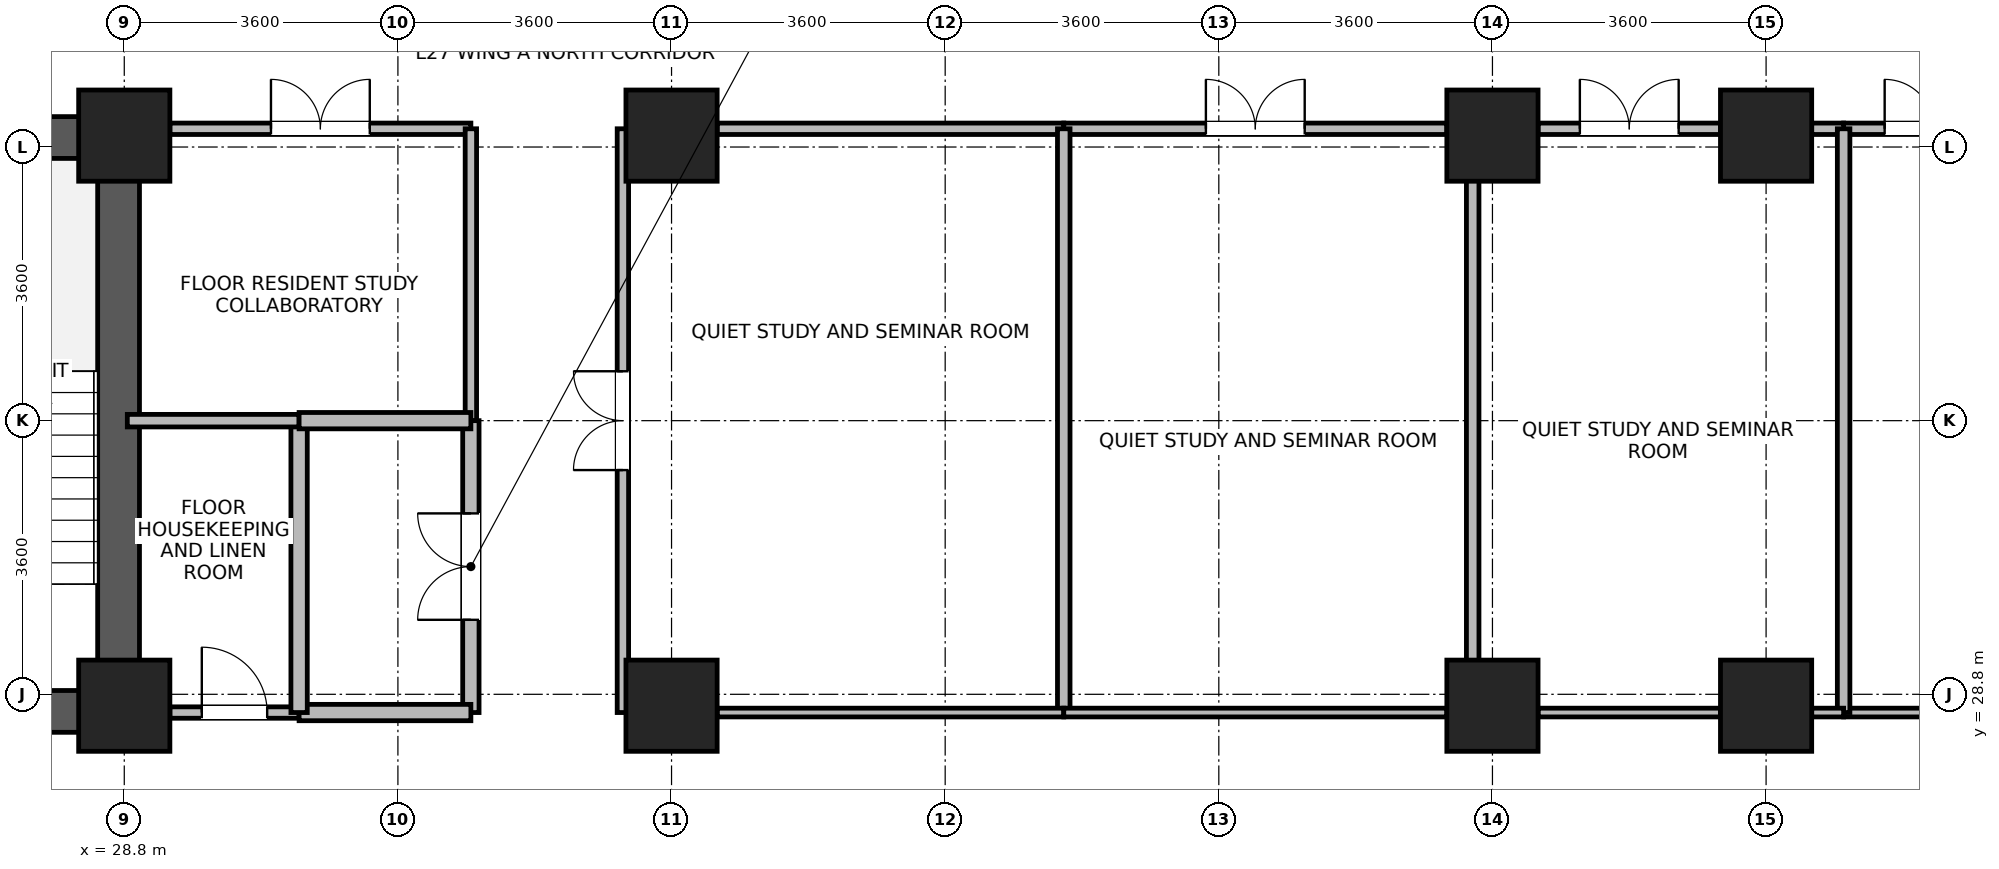
"""IFC4 building model, lengths in metres.
Left out: names, types, materials, properties, quantities, classifications, styles, units other than length and angle.
Written with IfcOpenShell. Run it as: python <this file> out.ifc"""

import sys

from ifc_helpers import new_model, si_unit, direction, frame, frame_2d, origin, origin_2d, place, context, subcontext, project, spatial, rectangle, extrude, source, transform, mapped, element, fill, save


model = new_model("IFC4")
c1 = context("Model", 3, precision=1e-05, world=origin(), true_north=direction((0.0, 1.0)))
c2 = subcontext(c1, "Body", "Model", "MODEL_VIEW")
j1 = project(units=[si_unit("LENGTHUNIT", "METRE"), si_unit("PLANEANGLEUNIT", "RADIAN")], contexts=[c1])
p1 = place(None, origin())
s1 = spatial("IfcSite", under=j1, at=p1, CompositionType="ELEMENT")
p2 = place(p1, origin())
s2 = spatial("IfcBuilding", under=s1, at=p2, CompositionType="ELEMENT")
p3 = place(p2, frame((0.0, 0.0, 108.2)))
s3 = spatial("IfcBuildingStorey", under=s2, at=p3, CompositionType="ELEMENT", Elevation=108.2)
p4 = place(p3, frame((28.725, 28.3, 0.0), z_axis=(0.0, 0.0, 1.0), x_axis=(0.0, 1.0, 0.0)))
e1 = element("IfcWall", 1, at=p4, inside=s3, PredefinedType="SHEAR", context=c2, shape_type="SweptSolid", body=[
    extrude(rectangle(XDim=8.1, YDim=0.55, at=frame_2d((4.05, 0.0))), origin(), (0.0, 0.0, 1.0), 3.45),
])
for number, where, z_axis, x_axis in (
    (2, (25.25, 28.575, 0.0), (0.0, 0.0, 1.0), (1.0, 0.0, 0.0)),
    (3, (25.25, 36.125, 0.0), (0.0, 0.0, 1.0), (1.0, 0.0, 0.0)),
):
    element("IfcWall", number, at=place(p3, frame(where, z_axis=z_axis, x_axis=x_axis)), inside=s3, PredefinedType="SHEAR", context=c2, shape_type="SweptSolid", body=[
        extrude(rectangle(XDim=3.2, YDim=0.55, at=frame_2d((1.6, 0.0))), origin(), (0.0, 0.0, 1.0), 3.45),
    ])
m1 = source(origin(), c2, "Body", "SweptSolid", [
    extrude(rectangle(XDim=1.2, YDim=1.2, at=origin_2d()), origin(), (0.0, 0.0, 1.0), 3.7),
])
for number, where, z_axis, x_axis in (
    (4, (28.8, 28.65, 0.0), (0.0, 0.0, 1.0), (1.0, 0.0, 0.0)),
    (5, (28.8, 36.15, 0.0), (0.0, 0.0, 1.0), (1.0, 0.0, 0.0)),
    (6, (36.0, 28.65, 0.0), (0.0, 0.0, 1.0), (1.0, 0.0, 0.0)),
    (7, (36.0, 36.15, 0.0), (0.0, 0.0, 1.0), (1.0, 0.0, 0.0)),
    (8, (46.8, 28.65, 0.0), (0.0, 0.0, 1.0), (1.0, 0.0, 0.0)),
    (9, (46.8, 36.15, 0.0), (0.0, 0.0, 1.0), (1.0, 0.0, 0.0)),
    (10, (50.4, 28.65, 0.0), (0.0, 0.0, 1.0), (1.0, 0.0, 0.0)),
    (11, (50.4, 36.15, 0.0), (0.0, 0.0, 1.0), (1.0, 0.0, 0.0)),
):
    element("IfcColumn", number, at=place(p3, frame(where, z_axis=z_axis, x_axis=x_axis)), inside=s3, PredefinedType="COLUMN", context=c2, shape_type="MappedRepresentation", body=[
        mapped(m1, transform((0.0, 0.0, 0.0), x_axis=(1.0, 0.0, 0.0), y_axis=(0.0, 1.0, 0.0), z_axis=(0.0, 0.0, 1.0), scale=1.0)),
    ])
p5 = place(p3, frame((51.42, 36.24, 0.0), z_axis=(0.0, 0.0, 1.0), x_axis=(1.0, 0.0, 0.0)))
e12 = element("IfcWall", 12, at=p5, inside=s3, PredefinedType="PARTITIONING", context=c2, shape_type="SweptSolid", body=[
    extrude(rectangle(XDim=2.38, YDim=0.15, at=frame_2d((1.19, 0.0))), origin(), (0.0, 0.0, 1.0), 2.78),
])
p6 = place(p5, frame((0.54, 0.0, 0.0)))
e13 = element("IfcOpeningElement", 13, at=p6, cuts=e12, PredefinedType="OPENING", context=c2, shape_type="SweptSolid", body=[
    extrude(rectangle(XDim=1.3, YDim=2.12, at=frame_2d((0.65, 1.06))), frame((0.0, 0.085, 0.0), z_axis=(0.0, -1.0, 0.0), x_axis=(1.0, 0.0, 0.0)), (0.0, 0.0, 1.0), 0.17),
])
p7 = place(p3, frame((35.36, 28.56, 0.0), z_axis=(0.0, 0.0, 1.0), x_axis=(0.0, 1.0, 0.0)))
e14 = element("IfcWall", 14, at=p7, inside=s3, PredefinedType="PARTITIONING", context=c2, shape_type="SweptSolid", body=[
    extrude(rectangle(XDim=7.68, YDim=0.15, at=frame_2d((3.84, 0.0))), origin(), (0.0, 0.0, 1.0), 3.43),
])
p8 = place(p7, frame((3.19, 0.0, 0.0)))
e15 = element("IfcOpeningElement", 15, at=p8, cuts=e14, PredefinedType="OPENING", context=c2, shape_type="SweptSolid", body=[
    extrude(rectangle(XDim=1.3, YDim=2.12, at=frame_2d((0.65, 1.06))), frame((0.0, 0.085, 0.0), z_axis=(0.0, -1.0, 0.0), x_axis=(1.0, 0.0, 0.0)), (0.0, 0.0, 1.0), 0.17),
])
p9 = place(p3, frame((36.6, 36.24, 0.0), z_axis=(0.0, 0.0, 1.0), x_axis=(1.0, 0.0, 0.0)))
e16 = element("IfcWall", 16, at=p9, inside=s3, PredefinedType="PARTITIONING", context=c2, shape_type="SweptSolid", body=[
    extrude(rectangle(XDim=4.56, YDim=0.15, at=frame_2d((2.28, 0.0))), origin(), (0.0, 0.0, 1.0), 2.78),
])
p10 = place(p3, frame((41.16, 36.24, 0.0), z_axis=(0.0, 0.0, 1.0), x_axis=(1.0, 0.0, 0.0)))
e17 = element("IfcWall", 17, at=p10, inside=s3, PredefinedType="PARTITIONING", context=c2, shape_type="SweptSolid", body=[
    extrude(rectangle(XDim=5.04, YDim=0.15, at=frame_2d((2.52, 0.0))), origin(), (0.0, 0.0, 1.0), 2.78),
])
p11 = place(p10, frame((1.87, 0.0, 0.0)))
e18 = element("IfcOpeningElement", 18, at=p11, cuts=e17, PredefinedType="OPENING", context=c2, shape_type="SweptSolid", body=[
    extrude(rectangle(XDim=1.3, YDim=2.12, at=frame_2d((0.65, 1.06))), frame((0.0, 0.085, 0.0), z_axis=(0.0, -1.0, 0.0), x_axis=(1.0, 0.0, 0.0)), (0.0, 0.0, 1.0), 0.17),
])
p12 = place(p3, frame((47.4, 36.24, 0.0), z_axis=(0.0, 0.0, 1.0), x_axis=(1.0, 0.0, 0.0)))
e19 = element("IfcWall", 19, at=p12, inside=s3, PredefinedType="PARTITIONING", context=c2, shape_type="SweptSolid", body=[
    extrude(rectangle(XDim=2.4, YDim=0.15, at=frame_2d((1.2, 0.0))), origin(), (0.0, 0.0, 1.0), 2.78),
])
p13 = place(p12, frame((0.55, 0.0, 0.0)))
e20 = element("IfcOpeningElement", 20, at=p13, cuts=e19, PredefinedType="OPENING", context=c2, shape_type="SweptSolid", body=[
    extrude(rectangle(XDim=1.3, YDim=2.12, at=frame_2d((0.65, 1.06))), frame((0.0, 0.085, 0.0), z_axis=(0.0, -1.0, 0.0), x_axis=(1.0, 0.0, 0.0)), (0.0, 0.0, 1.0), 0.17),
])
p14 = place(p3, frame((51.0, 36.24, 0.0), z_axis=(0.0, 0.0, 1.0), x_axis=(1.0, 0.0, 0.0)))
e21 = element("IfcWall", 21, at=p14, inside=s3, PredefinedType="PARTITIONING", context=c2, shape_type="SweptSolid", body=[
    extrude(rectangle(XDim=0.42, YDim=0.15, at=frame_2d((0.21, 0.0))), origin(), (0.0, 0.0, 1.0), 2.78),
])
p15 = place(p3, frame((29.4, 36.24, 0.0), z_axis=(0.0, 0.0, 1.0), x_axis=(1.0, 0.0, 0.0)))
e22 = element("IfcWall", 22, at=p15, inside=s3, PredefinedType="PARTITIONING", context=c2, shape_type="SweptSolid", body=[
    extrude(rectangle(XDim=3.96, YDim=0.15, at=frame_2d((1.98, 0.0))), origin(), (0.0, 0.0, 1.0), 2.78),
])
p16 = place(p15, frame((1.33, 0.0, 0.0)))
e23 = element("IfcOpeningElement", 23, at=p16, cuts=e22, PredefinedType="OPENING", context=c2, shape_type="SweptSolid", body=[
    extrude(rectangle(XDim=1.3, YDim=2.12, at=frame_2d((0.65, 1.06))), frame((0.0, 0.085, 0.0), z_axis=(0.0, -1.0, 0.0), x_axis=(1.0, 0.0, 0.0)), (0.0, 0.0, 1.0), 0.17),
])
p17 = place(p3, frame((33.36, 32.4, 0.0), z_axis=(0.0, 0.0, 1.0), x_axis=(0.0, 1.0, 0.0)))
e24 = element("IfcWall", 24, at=p17, inside=s3, PredefinedType="PARTITIONING", context=c2, shape_type="SweptSolid", body=[
    extrude(rectangle(XDim=3.84, YDim=0.15, at=frame_2d((1.92, 0.0))), origin(), (0.0, 0.0, 1.0), 3.43),
])
p18 = place(p3, frame((33.36, 28.56, 0.0), z_axis=(0.0, 0.0, 1.0), x_axis=(0.0, 1.0, 0.0)))
e25 = element("IfcWall", 25, at=p18, inside=s3, PredefinedType="PARTITIONING", context=c2, shape_type="SweptSolid", body=[
    extrude(rectangle(XDim=3.84, YDim=0.215, at=frame_2d((1.92, 0.0))), origin(), (0.0, 0.0, 1.0), 3.43),
])
p19 = place(p18, frame((1.22, 0.0, 0.0)))
e26 = element("IfcOpeningElement", 26, at=p19, cuts=e25, PredefinedType="OPENING", context=c2, shape_type="SweptSolid", body=[
    extrude(rectangle(XDim=1.4, YDim=2.15, at=frame_2d((0.7, 1.075))), frame((0.0, 0.118, 0.0), z_axis=(0.0, -1.0, 0.0), x_axis=(1.0, 0.0, 0.0)), (0.0, 0.0, 1.0), 0.235),
])
p20 = place(p3, frame((29.4, 28.56, 0.0), z_axis=(0.0, 0.0, 1.0), x_axis=(1.0, 0.0, 0.0)))
e27 = element("IfcWall", 27, at=p20, inside=s3, PredefinedType="PARTITIONING", context=c2, shape_type="SweptSolid", body=[
    extrude(rectangle(XDim=1.7, YDim=0.15, at=frame_2d((0.85, 0.0))), origin(), (0.0, 0.0, 1.0), 2.78),
])
p21 = place(p20, frame((0.42, 0.0, 0.0)))
e28 = element("IfcOpeningElement", 28, at=p21, cuts=e27, PredefinedType="OPENING", context=c2, shape_type="SweptSolid", body=[
    extrude(rectangle(XDim=0.86, YDim=2.02, at=frame_2d((0.43, 1.01))), frame((0.0, 0.085, 0.0), z_axis=(0.0, -1.0, 0.0), x_axis=(1.0, 0.0, 0.0)), (0.0, 0.0, 1.0), 0.17),
])
p22 = place(p3, frame((31.1, 28.56, 0.0), z_axis=(0.0, 0.0, 1.0), x_axis=(1.0, 0.0, 0.0)))
e29 = element("IfcWall", 29, at=p22, inside=s3, PredefinedType="PARTITIONING", context=c2, shape_type="SweptSolid", body=[
    extrude(rectangle(XDim=2.26, YDim=0.215, at=frame_2d((1.13, 0.0))), origin(), (0.0, 0.0, 1.0), 2.78),
])
p23 = place(p3, frame((51.42, 28.56, 0.0), z_axis=(0.0, 0.0, 1.0), x_axis=(1.0, 0.0, 0.0)))
e30 = element("IfcWall", 30, at=p23, inside=s3, PredefinedType="PARTITIONING", context=c2, shape_type="SweptSolid", body=[
    extrude(rectangle(XDim=2.38, YDim=0.115, at=frame_2d((1.19, 0.0))), origin(), (0.0, 0.0, 1.0), 2.78),
])
for number, where, z_axis, x_axis in (
    (31, (41.16, 28.56, 0.0), (0.0, 0.0, 1.0), (0.0, 1.0, 0.0)),
    (32, (46.54, 28.56, 0.0), (0.0, 0.0, 1.0), (0.0, 1.0, 0.0)),
    (33, (51.42, 28.56, 0.0), (0.0, 0.0, 1.0), (0.0, 1.0, 0.0)),
):
    element("IfcWall", number, at=place(p3, frame(where, z_axis=z_axis, x_axis=x_axis)), inside=s3, PredefinedType="PARTITIONING", context=c2, shape_type="SweptSolid", body=[
        extrude(rectangle(XDim=7.68, YDim=0.165, at=frame_2d((3.84, 0.0))), origin(), (0.0, 0.0, 1.0), 3.43),
    ])
p24 = place(p3, frame((36.6, 28.56, 0.0), z_axis=(0.0, 0.0, 1.0), x_axis=(1.0, 0.0, 0.0)))
e34 = element("IfcWall", 34, at=p24, inside=s3, PredefinedType="PARTITIONING", context=c2, shape_type="SweptSolid", body=[
    extrude(rectangle(XDim=4.56, YDim=0.115, at=frame_2d((2.28, 0.0))), origin(), (0.0, 0.0, 1.0), 2.78),
])
p25 = place(p3, frame((41.16, 28.56, 0.0), z_axis=(0.0, 0.0, 1.0), x_axis=(1.0, 0.0, 0.0)))
e35 = element("IfcWall", 35, at=p25, inside=s3, PredefinedType="PARTITIONING", context=c2, shape_type="SweptSolid", body=[
    extrude(rectangle(XDim=5.04, YDim=0.115, at=frame_2d((2.52, 0.0))), origin(), (0.0, 0.0, 1.0), 2.78),
])
p26 = place(p3, frame((47.4, 28.56, 0.0), z_axis=(0.0, 0.0, 1.0), x_axis=(1.0, 0.0, 0.0)))
e36 = element("IfcWall", 36, at=p26, inside=s3, PredefinedType="PARTITIONING", context=c2, shape_type="SweptSolid", body=[
    extrude(rectangle(XDim=2.4, YDim=0.115, at=frame_2d((1.2, 0.0))), origin(), (0.0, 0.0, 1.0), 2.78),
])
p27 = place(p3, frame((51.0, 28.56, 0.0), z_axis=(0.0, 0.0, 1.0), x_axis=(1.0, 0.0, 0.0)))
e37 = element("IfcWall", 37, at=p27, inside=s3, PredefinedType="PARTITIONING", context=c2, shape_type="SweptSolid", body=[
    extrude(rectangle(XDim=0.42, YDim=0.115, at=frame_2d((0.21, 0.0))), origin(), (0.0, 0.0, 1.0), 2.78),
])
p28 = place(p3, frame((31.1, 28.56, 0.0), z_axis=(0.0, 0.0, 1.0), x_axis=(0.0, 1.0, 0.0)))
e38 = element("IfcWall", 38, at=p28, inside=s3, PredefinedType="PARTITIONING", context=c2, shape_type="SweptSolid", body=[
    extrude(rectangle(XDim=3.84, YDim=0.215, at=frame_2d((1.92, 0.0))), origin(), (0.0, 0.0, 1.0), 3.43),
])
p29 = place(p3, frame((28.84, 32.4, 0.0), z_axis=(0.0, 0.0, 1.0), x_axis=(1.0, 0.0, 0.0)))
e39 = element("IfcWall", 39, at=p29, inside=s3, PredefinedType="PARTITIONING", context=c2, shape_type="SweptSolid", body=[
    extrude(rectangle(XDim=2.26, YDim=0.165, at=frame_2d((1.13, 0.0))), origin(), (0.0, 0.0, 1.0), 3.43),
])
p30 = place(p3, frame((31.1, 32.4, 0.0), z_axis=(0.0, 0.0, 1.0), x_axis=(1.0, 0.0, 0.0)))
e40 = element("IfcWall", 40, at=p30, inside=s3, PredefinedType="PARTITIONING", context=c2, shape_type="SweptSolid", body=[
    extrude(rectangle(XDim=2.26, YDim=0.215, at=frame_2d((1.13, 0.0))), origin(), (0.0, 0.0, 1.0), 3.43),
])
p31 = place(p6, origin())
e41 = element("IfcDoor", 41, at=p31, inside=s3, OperationType="DOUBLE_DOOR_SINGLE_SWING", PredefinedType="DOOR", context=c2, shape_type="SweptSolid", body=[
    extrude(rectangle(XDim=1.3, YDim=2.12, at=frame_2d((0.65, 1.06))), frame((0.0, 0.025, 0.0), z_axis=(0.0, -1.0, 0.0), x_axis=(1.0, 0.0, 0.0)), (0.0, 0.0, 1.0), 0.05),
])
fill(e13, e41)
p32 = place(p8, origin())
e42 = element("IfcDoor", 42, at=p32, inside=s3, OperationType="DOUBLE_DOOR_SINGLE_SWING", PredefinedType="DOOR", context=c2, shape_type="SweptSolid", body=[
    extrude(rectangle(XDim=1.3, YDim=2.12, at=frame_2d((0.65, 1.06))), frame((0.0, 0.025, 0.0), z_axis=(0.0, -1.0, 0.0), x_axis=(1.0, 0.0, 0.0)), (0.0, 0.0, 1.0), 0.05),
])
fill(e15, e42)
p33 = place(p11, origin())
e43 = element("IfcDoor", 43, at=p33, inside=s3, OperationType="DOUBLE_DOOR_SINGLE_SWING", PredefinedType="DOOR", context=c2, shape_type="SweptSolid", body=[
    extrude(rectangle(XDim=1.3, YDim=2.12, at=frame_2d((0.65, 1.06))), frame((0.0, 0.025, 0.0), z_axis=(0.0, -1.0, 0.0), x_axis=(1.0, 0.0, 0.0)), (0.0, 0.0, 1.0), 0.05),
])
fill(e18, e43)
p34 = place(p13, origin())
e44 = element("IfcDoor", 44, at=p34, inside=s3, OperationType="DOUBLE_DOOR_SINGLE_SWING", PredefinedType="DOOR", context=c2, shape_type="SweptSolid", body=[
    extrude(rectangle(XDim=1.3, YDim=2.12, at=frame_2d((0.65, 1.06))), frame((0.0, 0.025, 0.0), z_axis=(0.0, -1.0, 0.0), x_axis=(1.0, 0.0, 0.0)), (0.0, 0.0, 1.0), 0.05),
])
fill(e20, e44)
p35 = place(p16, origin())
e45 = element("IfcDoor", 45, at=p35, inside=s3, OperationType="DOUBLE_DOOR_SINGLE_SWING", PredefinedType="DOOR", context=c2, shape_type="SweptSolid", body=[
    extrude(rectangle(XDim=1.3, YDim=2.12, at=frame_2d((0.65, 1.06))), frame((0.0, 0.025, 0.0), z_axis=(0.0, -1.0, 0.0), x_axis=(1.0, 0.0, 0.0)), (0.0, 0.0, 1.0), 0.05),
])
fill(e23, e45)
p36 = place(p19, origin())
e46 = element("IfcDoor", 46, at=p36, inside=s3, OperationType="DOUBLE_DOOR_SINGLE_SWING", PredefinedType="DOOR", context=c2, shape_type="SweptSolid", body=[
    extrude(rectangle(XDim=1.4, YDim=2.15, at=frame_2d((0.7, 1.075))), frame((0.0, 0.025, 0.0), z_axis=(0.0, -1.0, 0.0), x_axis=(1.0, 0.0, 0.0)), (0.0, 0.0, 1.0), 0.05),
])
fill(e26, e46)
p37 = place(p21, origin())
e47 = element("IfcDoor", 47, at=p37, inside=s3, OperationType="SINGLE_SWING_LEFT", PredefinedType="DOOR", context=c2, shape_type="SweptSolid", body=[
    extrude(rectangle(XDim=0.86, YDim=2.02, at=frame_2d((0.43, 1.01))), frame((0.0, 0.025, 0.0), z_axis=(0.0, -1.0, 0.0), x_axis=(1.0, 0.0, 0.0)), (0.0, 0.0, 1.0), 0.05),
])
fill(e28, e47)
save(model, sys.argv[1])
